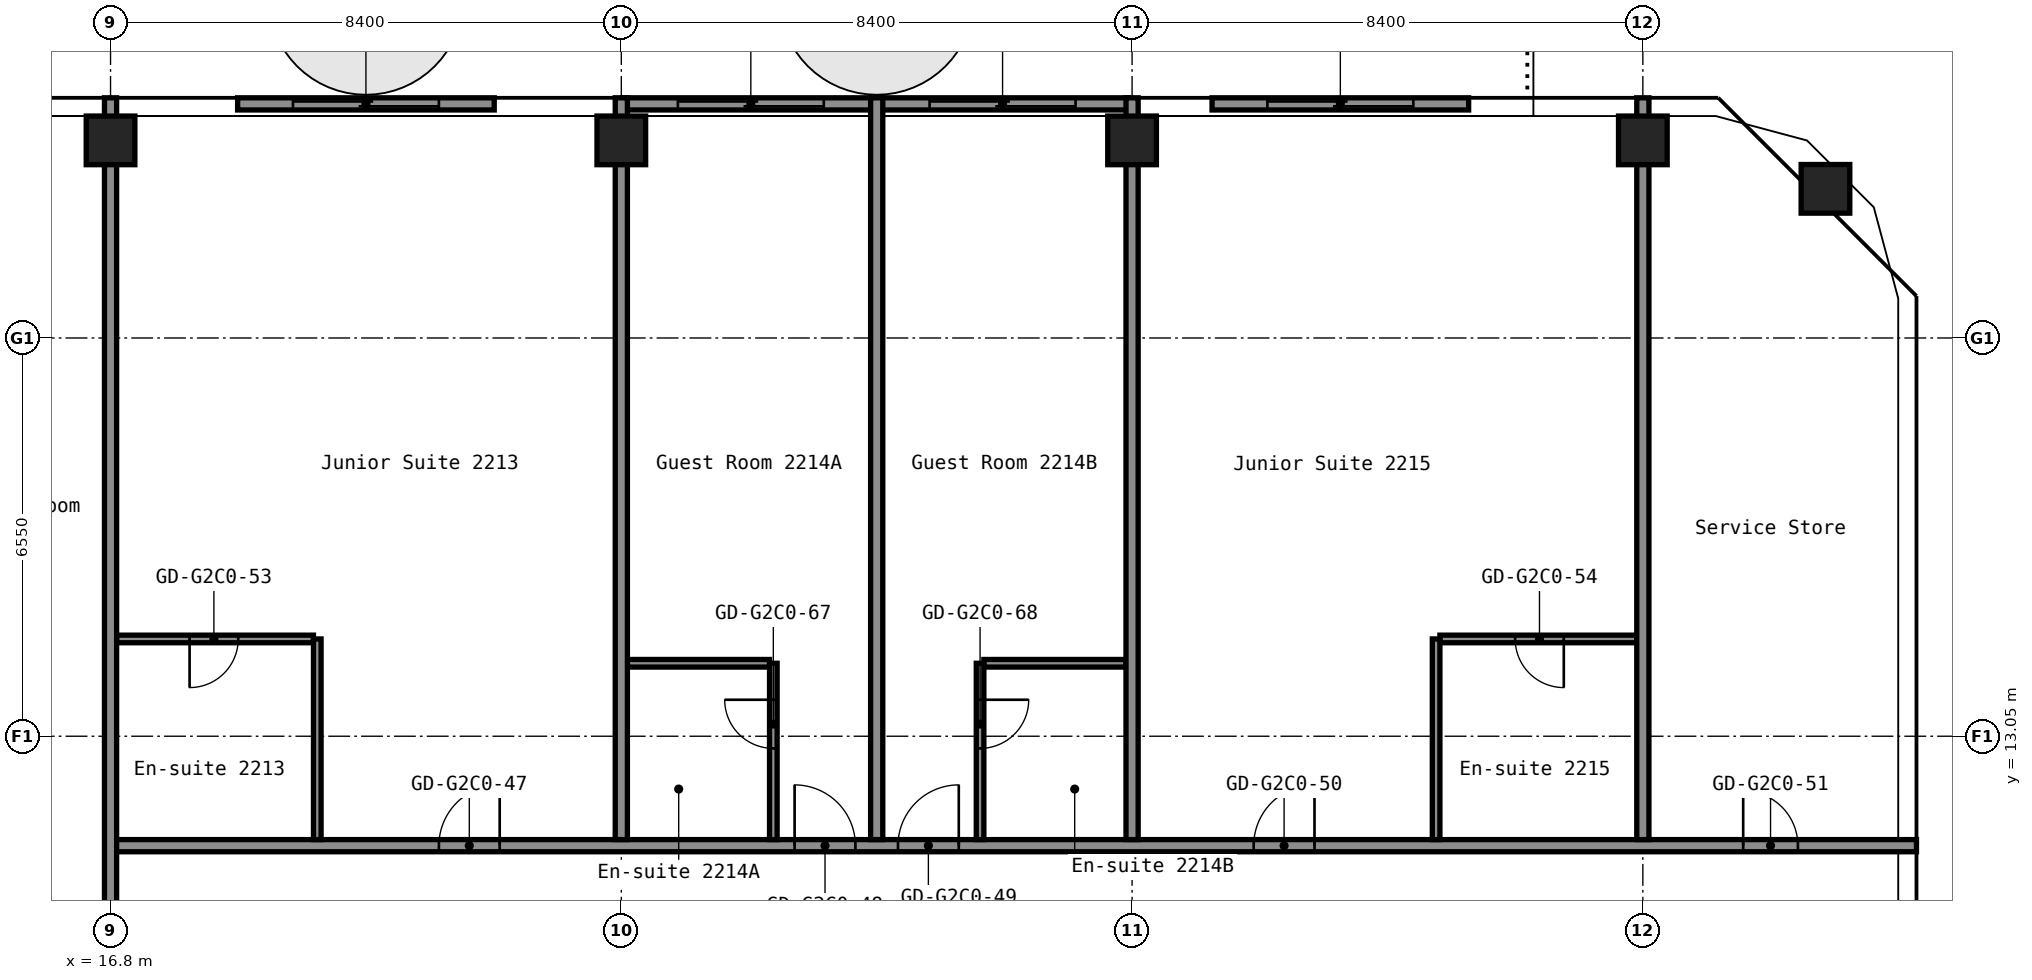
"""IFC4 building model, lengths in metres.
Left out: names, types, materials, properties, quantities, classifications, styles, units other than length and angle.
Written with IfcOpenShell. Run it as: python <this file> out.ifc"""

import sys

from ifc_helpers import new_model, si_unit, direction, frame, frame_2d, origin, origin_2d, place, context, subcontext, project, spatial, rectangle, hollow_rectangle, extrude, element, fill, save


model = new_model("IFC4")
c1 = context("Model", 3, precision=1e-05, world=origin(), true_north=direction((0.0, 1.0)))
c2 = subcontext(c1, "Body", "Model", "MODEL_VIEW")
j1 = project(units=[si_unit("LENGTHUNIT", "METRE"), si_unit("PLANEANGLEUNIT", "RADIAN")], contexts=[c1])
p1 = place(None, origin())
s1 = spatial("IfcSite", under=j1, at=p1, CompositionType="ELEMENT")
p2 = place(p1, origin())
s2 = spatial("IfcBuilding", under=s1, at=p2, CompositionType="ELEMENT")
p3 = place(p2, frame((0.0, 0.0, 81.8)))
s3 = spatial("IfcBuildingStorey", under=s2, at=p3, CompositionType="ELEMENT", Elevation=81.8)
for number, where, z_axis, x_axis in (
    (1, (16.8, 22.85, 0.0), (0.0, 0.0, 1.0), (1.0, 0.0, 0.0)),
    (2, (25.2, 22.85, 0.0), (0.0, 0.0, 1.0), (1.0, 0.0, 0.0)),
    (3, (33.6, 22.85, 0.0), (0.0, 0.0, 1.0), (1.0, 0.0, 0.0)),
    (4, (42.0, 22.85, 0.0), (0.0, 0.0, 1.0), (1.0, 0.0, 0.0)),
    (5, (45.003, 22.053, 0.0), (0.0, 0.0, 1.0), (1.0, 0.0, 0.0)),
):
    element("IfcColumn", number, at=place(p3, frame(where, z_axis=z_axis, x_axis=x_axis)), inside=s3, PredefinedType="COLUMN", context=c2, shape_type="SweptSolid", body=[
        extrude(hollow_rectangle(XDim=0.8, YDim=0.8, WallThickness=0.032, at=origin_2d()), origin(), (0.0, 0.0, 1.0), 2.8),
    ])
p4 = place(p3, frame((16.8, 11.25, 0.0), z_axis=(0.0, 0.0, 1.0), x_axis=(1.0, 0.0, 0.0)))
e6 = element("IfcWall", 6, at=p4, inside=s3, PredefinedType="PARTITIONING", context=c2, shape_type="SweptSolid", body=[
    extrude(rectangle(XDim=29.7, YDim=0.2, at=frame_2d((14.85, 0.0))), origin(), (0.0, 0.0, 1.0), 2.8),
])
p5 = place(p4, frame((5.4, 0.0, 0.0)))
e7 = element("IfcOpeningElement", 7, at=p5, cuts=e6, PredefinedType="OPENING", context=c2, shape_type="SweptSolid", body=[
    extrude(rectangle(XDim=1.0, YDim=2.1, at=frame_2d((0.5, 1.05))), frame((0.0, 0.11, 0.0), z_axis=(0.0, -1.0, 0.0), x_axis=(1.0, 0.0, 0.0)), (0.0, 0.0, 1.0), 0.22),
])
p6 = place(p4, frame((11.25, 0.0, 0.0)))
e8 = element("IfcOpeningElement", 8, at=p6, cuts=e6, PredefinedType="OPENING", context=c2, shape_type="SweptSolid", body=[
    extrude(rectangle(XDim=1.0, YDim=2.1, at=frame_2d((0.5, 1.05))), frame((0.0, 0.11, 0.0), z_axis=(0.0, -1.0, 0.0), x_axis=(1.0, 0.0, 0.0)), (0.0, 0.0, 1.0), 0.22),
])
p7 = place(p4, frame((12.95, 0.0, 0.0)))
e9 = element("IfcOpeningElement", 9, at=p7, cuts=e6, PredefinedType="OPENING", context=c2, shape_type="SweptSolid", body=[
    extrude(rectangle(XDim=1.0, YDim=2.1, at=frame_2d((0.5, 1.05))), frame((0.0, 0.11, 0.0), z_axis=(0.0, -1.0, 0.0), x_axis=(1.0, 0.0, 0.0)), (0.0, 0.0, 1.0), 0.22),
])
p8 = place(p4, frame((18.8, 0.0, 0.0)))
e10 = element("IfcOpeningElement", 10, at=p8, cuts=e6, PredefinedType="OPENING", context=c2, shape_type="SweptSolid", body=[
    extrude(rectangle(XDim=1.0, YDim=2.1, at=frame_2d((0.5, 1.05))), frame((0.0, 0.11, 0.0), z_axis=(0.0, -1.0, 0.0), x_axis=(1.0, 0.0, 0.0)), (0.0, 0.0, 1.0), 0.22),
])
p9 = place(p4, frame((26.85, 0.0, 0.0)))
e11 = element("IfcOpeningElement", 11, at=p9, cuts=e6, PredefinedType="OPENING", context=c2, shape_type="SweptSolid", body=[
    extrude(rectangle(XDim=0.9, YDim=2.1, at=frame_2d((0.45, 1.05))), frame((0.0, 0.11, 0.0), z_axis=(0.0, -1.0, 0.0), x_axis=(1.0, 0.0, 0.0)), (0.0, 0.0, 1.0), 0.22),
])
for number, where, z_axis, x_axis in (
    (12, (25.3, 14.25, 0.0), (0.0, 0.0, 1.0), (1.0, 0.0, 0.0)),
    (13, (31.163, 14.25, 0.0), (0.0, 0.0, 1.0), (1.0, 0.0, 0.0)),
):
    element("IfcWall", number, at=place(p3, frame(where, z_axis=z_axis, x_axis=x_axis)), inside=s3, PredefinedType="PARTITIONING", context=c2, shape_type="SweptSolid", body=[
        extrude(rectangle(XDim=2.337, YDim=0.125, at=frame_2d((1.169, 0.0))), origin(), (0.0, 0.0, 1.0), 2.8),
    ])
p10 = place(p3, frame((16.9, 14.65, 0.0), z_axis=(0.0, 0.0, 1.0), x_axis=(1.0, 0.0, 0.0)))
e14 = element("IfcWall", 14, at=p10, inside=s3, PredefinedType="PARTITIONING", context=c2, shape_type="SweptSolid", body=[
    extrude(rectangle(XDim=3.238, YDim=0.125, at=frame_2d((1.619, 0.0))), origin(), (0.0, 0.0, 1.0), 2.8),
])
p11 = place(p10, frame((1.2, 0.0, 0.0)))
e15 = element("IfcOpeningElement", 15, at=p11, cuts=e14, PredefinedType="OPENING", context=c2, shape_type="SweptSolid", body=[
    extrude(rectangle(XDim=0.8, YDim=2.1, at=frame_2d((0.4, 1.05))), frame((0.0, 0.073, 0.0), z_axis=(0.0, -1.0, 0.0), x_axis=(1.0, 0.0, 0.0)), (0.0, 0.0, 1.0), 0.145),
])
p12 = place(p3, frame((38.663, 14.65, 0.0), z_axis=(0.0, 0.0, 1.0), x_axis=(1.0, 0.0, 0.0)))
e16 = element("IfcWall", 16, at=p12, inside=s3, PredefinedType="PARTITIONING", context=c2, shape_type="SweptSolid", body=[
    extrude(rectangle(XDim=3.237, YDim=0.125, at=frame_2d((1.619, 0.0))), origin(), (0.0, 0.0, 1.0), 2.8),
])
p13 = place(p12, frame((1.238, 0.0, 0.0)))
e17 = element("IfcOpeningElement", 17, at=p13, cuts=e16, PredefinedType="OPENING", context=c2, shape_type="SweptSolid", body=[
    extrude(rectangle(XDim=0.8, YDim=2.1, at=frame_2d((0.4, 1.05))), frame((0.0, 0.073, 0.0), z_axis=(0.0, -1.0, 0.0), x_axis=(1.0, 0.0, 0.0)), (0.0, 0.0, 1.0), 0.145),
])
p14 = place(p3, frame((16.8, 10.19, 0.0), z_axis=(0.0, 0.0, 1.0), x_axis=(0.0, 1.0, 0.0)))
e18 = element("IfcWall", 18, at=p14, inside=s3, PredefinedType="PARTITIONING", context=c2, shape_type="SweptSolid", body=[
    extrude(rectangle(XDim=13.36, YDim=0.2, at=frame_2d((6.68, 0.0))), origin(), (0.0, 0.0, 1.0), 2.8),
])
p15 = place(p3, frame((20.2, 11.35, 0.0), z_axis=(0.0, 0.0, 1.0), x_axis=(0.0, 1.0, 0.0)))
e19 = element("IfcWall", 19, at=p15, inside=s3, PredefinedType="PARTITIONING", context=c2, shape_type="SweptSolid", body=[
    extrude(rectangle(XDim=3.3, YDim=0.125, at=frame_2d((1.65, 0.0))), origin(), (0.0, 0.0, 1.0), 2.8),
])
p16 = place(p3, frame((25.2, 11.35, 0.0), z_axis=(0.0, 0.0, 1.0), x_axis=(0.0, 1.0, 0.0)))
e20 = element("IfcWall", 20, at=p16, inside=s3, PredefinedType="PARTITIONING", context=c2, shape_type="SweptSolid", body=[
    extrude(rectangle(XDim=12.2, YDim=0.2, at=frame_2d((6.1, 0.0))), origin(), (0.0, 0.0, 1.0), 2.8),
])
p17 = place(p3, frame((27.7, 11.35, 0.0), z_axis=(0.0, 0.0, 1.0), x_axis=(0.0, 1.0, 0.0)))
e21 = element("IfcWall", 21, at=p17, inside=s3, PredefinedType="PARTITIONING", context=c2, shape_type="SweptSolid", body=[
    extrude(rectangle(XDim=2.9, YDim=0.125, at=frame_2d((1.45, 0.0))), origin(), (0.0, 0.0, 1.0), 2.8),
])
p18 = place(p17, frame((1.5, 0.0, 0.0)))
e22 = element("IfcOpeningElement", 22, at=p18, cuts=e21, PredefinedType="OPENING", context=c2, shape_type="SweptSolid", body=[
    extrude(rectangle(XDim=0.8, YDim=2.1, at=frame_2d((0.4, 1.05))), frame((0.0, 0.073, 0.0), z_axis=(0.0, -1.0, 0.0), x_axis=(1.0, 0.0, 0.0)), (0.0, 0.0, 1.0), 0.145),
])
p19 = place(p3, frame((29.4, 11.35, 0.0), z_axis=(0.0, 0.0, 1.0), x_axis=(0.0, 1.0, 0.0)))
e23 = element("IfcWall", 23, at=p19, inside=s3, PredefinedType="PARTITIONING", context=c2, shape_type="SweptSolid", body=[
    extrude(rectangle(XDim=12.2, YDim=0.2, at=frame_2d((6.1, 0.0))), origin(), (0.0, 0.0, 1.0), 2.8),
])
p20 = place(p3, frame((31.1, 11.35, 0.0), z_axis=(0.0, 0.0, 1.0), x_axis=(0.0, 1.0, 0.0)))
e24 = element("IfcWall", 24, at=p20, inside=s3, PredefinedType="PARTITIONING", context=c2, shape_type="SweptSolid", body=[
    extrude(rectangle(XDim=2.9, YDim=0.125, at=frame_2d((1.45, 0.0))), origin(), (0.0, 0.0, 1.0), 2.8),
])
p21 = place(p20, frame((1.5, 0.0, 0.0)))
e25 = element("IfcOpeningElement", 25, at=p21, cuts=e24, PredefinedType="OPENING", context=c2, shape_type="SweptSolid", body=[
    extrude(rectangle(XDim=0.8, YDim=2.1, at=frame_2d((0.4, 1.05))), frame((0.0, 0.073, 0.0), z_axis=(0.0, -1.0, 0.0), x_axis=(1.0, 0.0, 0.0)), (0.0, 0.0, 1.0), 0.145),
])
p22 = place(p3, frame((33.6, 11.35, 0.0), z_axis=(0.0, 0.0, 1.0), x_axis=(0.0, 1.0, 0.0)))
e26 = element("IfcWall", 26, at=p22, inside=s3, PredefinedType="PARTITIONING", context=c2, shape_type="SweptSolid", body=[
    extrude(rectangle(XDim=12.2, YDim=0.2, at=frame_2d((6.1, 0.0))), origin(), (0.0, 0.0, 1.0), 2.8),
])
p23 = place(p3, frame((38.6, 11.35, 0.0), z_axis=(0.0, 0.0, 1.0), x_axis=(0.0, 1.0, 0.0)))
e27 = element("IfcWall", 27, at=p23, inside=s3, PredefinedType="PARTITIONING", context=c2, shape_type="SweptSolid", body=[
    extrude(rectangle(XDim=3.3, YDim=0.125, at=frame_2d((1.65, 0.0))), origin(), (0.0, 0.0, 1.0), 2.8),
])
p24 = place(p3, frame((42.0, 11.35, 0.0), z_axis=(0.0, 0.0, 1.0), x_axis=(0.0, 1.0, 0.0)))
e28 = element("IfcWall", 28, at=p24, inside=s3, PredefinedType="PARTITIONING", context=c2, shape_type="SweptSolid", body=[
    extrude(rectangle(XDim=12.2, YDim=0.2, at=frame_2d((6.1, 0.0))), origin(), (0.0, 0.0, 1.0), 2.8),
])
p25 = place(p3, frame((39.135, 23.45, 0.0), z_axis=(0.0, 0.0, 1.0), x_axis=(-1.0, 0.0, 0.0)))
p26 = place(p25, frame((0.91, 0.0, 0.0)))
p27 = place(p26, frame((2.4, 0.0, 0.0), z_axis=(0.0, 0.0, 1.0), x_axis=(-1.0, 0.0, 0.0)))
e29 = element("IfcDoor", 29, at=p27, inside=s3, OperationType="SLIDING_TO_LEFT", PredefinedType="DOOR", context=c2, shape_type="SweptSolid", body=[
    extrude(rectangle(XDim=2.4, YDim=2.2, at=frame_2d((1.2, 1.1))), frame((0.0, 0.025, 0.0), z_axis=(0.0, -1.0, 0.0), x_axis=(1.0, 0.0, 0.0)), (0.0, 0.0, 1.0), 0.05),
])
p28 = place(p3, frame((33.58, 23.45, 0.0), z_axis=(0.0, 0.0, 1.0), x_axis=(-1.0, 0.0, 0.0)))
p29 = place(p28, frame((0.91, 0.0, 0.0)))
p30 = place(p29, frame((2.4, 0.0, 0.0), z_axis=(0.0, 0.0, 1.0), x_axis=(-1.0, 0.0, 0.0)))
e30 = element("IfcDoor", 30, at=p30, inside=s3, OperationType="SLIDING_TO_LEFT", PredefinedType="DOOR", context=c2, shape_type="SweptSolid", body=[
    extrude(rectangle(XDim=2.4, YDim=2.2, at=frame_2d((1.2, 1.1))), frame((0.0, 0.025, 0.0), z_axis=(0.0, -1.0, 0.0), x_axis=(1.0, 0.0, 0.0)), (0.0, 0.0, 1.0), 0.05),
])
p31 = place(p3, frame((29.44, 23.45, 0.0), z_axis=(0.0, 0.0, 1.0), x_axis=(-1.0, 0.0, 0.0)))
p32 = place(p31, frame((0.91, 0.0, 0.0)))
p33 = place(p32, frame((2.4, 0.0, 0.0), z_axis=(0.0, 0.0, 1.0), x_axis=(-1.0, 0.0, 0.0)))
e31 = element("IfcDoor", 31, at=p33, inside=s3, OperationType="SLIDING_TO_LEFT", PredefinedType="DOOR", context=c2, shape_type="SweptSolid", body=[
    extrude(rectangle(XDim=2.4, YDim=2.2, at=frame_2d((1.2, 1.1))), frame((0.0, 0.025, 0.0), z_axis=(0.0, -1.0, 0.0), x_axis=(1.0, 0.0, 0.0)), (0.0, 0.0, 1.0), 0.05),
])
p34 = place(p3, frame((23.11, 23.45, 0.0), z_axis=(0.0, 0.0, 1.0), x_axis=(-1.0, 0.0, 0.0)))
p35 = place(p34, frame((0.91, 0.0, 0.0)))
p36 = place(p35, frame((2.4, 0.0, 0.0), z_axis=(0.0, 0.0, 1.0), x_axis=(-1.0, 0.0, 0.0)))
e32 = element("IfcDoor", 32, at=p36, inside=s3, OperationType="SLIDING_TO_LEFT", PredefinedType="DOOR", context=c2, shape_type="SweptSolid", body=[
    extrude(rectangle(XDim=2.4, YDim=2.2, at=frame_2d((1.2, 1.1))), frame((0.0, 0.025, 0.0), z_axis=(0.0, -1.0, 0.0), x_axis=(1.0, 0.0, 0.0)), (0.0, 0.0, 1.0), 0.05),
])
p37 = place(p5, origin())
e33 = element("IfcDoor", 33, at=p37, inside=s3, OperationType="SINGLE_SWING_LEFT", PredefinedType="DOOR", context=c2, shape_type="SweptSolid", body=[
    extrude(rectangle(XDim=1.0, YDim=2.1, at=frame_2d((0.5, 1.05))), frame((0.0, 0.025, 0.0), z_axis=(0.0, -1.0, 0.0), x_axis=(1.0, 0.0, 0.0)), (0.0, 0.0, 1.0), 0.05),
])
fill(e7, e33)
p38 = place(p6, origin())
e34 = element("IfcDoor", 34, at=p38, inside=s3, OperationType="SINGLE_SWING_RIGHT", PredefinedType="DOOR", context=c2, shape_type="SweptSolid", body=[
    extrude(rectangle(XDim=1.0, YDim=2.1, at=frame_2d((0.5, 1.05))), frame((0.0, 0.025, 0.0), z_axis=(0.0, -1.0, 0.0), x_axis=(1.0, 0.0, 0.0)), (0.0, 0.0, 1.0), 0.05),
])
fill(e8, e34)
p39 = place(p7, origin())
e35 = element("IfcDoor", 35, at=p39, inside=s3, OperationType="SINGLE_SWING_LEFT", PredefinedType="DOOR", context=c2, shape_type="SweptSolid", body=[
    extrude(rectangle(XDim=1.0, YDim=2.1, at=frame_2d((0.5, 1.05))), frame((0.0, 0.025, 0.0), z_axis=(0.0, -1.0, 0.0), x_axis=(1.0, 0.0, 0.0)), (0.0, 0.0, 1.0), 0.05),
])
fill(e9, e35)
p40 = place(p8, origin())
e36 = element("IfcDoor", 36, at=p40, inside=s3, OperationType="SINGLE_SWING_LEFT", PredefinedType="DOOR", context=c2, shape_type="SweptSolid", body=[
    extrude(rectangle(XDim=1.0, YDim=2.1, at=frame_2d((0.5, 1.05))), frame((0.0, 0.025, 0.0), z_axis=(0.0, -1.0, 0.0), x_axis=(1.0, 0.0, 0.0)), (0.0, 0.0, 1.0), 0.05),
])
fill(e10, e36)
p41 = place(p9, origin())
e37 = element("IfcDoor", 37, at=p41, inside=s3, OperationType="SINGLE_SWING_RIGHT", PredefinedType="DOOR", context=c2, shape_type="SweptSolid", body=[
    extrude(rectangle(XDim=0.9, YDim=2.1, at=frame_2d((0.45, 1.05))), frame((0.0, 0.025, 0.0), z_axis=(0.0, -1.0, 0.0), x_axis=(1.0, 0.0, 0.0)), (0.0, 0.0, 1.0), 0.05),
])
fill(e11, e37)
p42 = place(p11, origin())
e38 = element("IfcDoor", 38, at=p42, inside=s3, OperationType="SINGLE_SWING_LEFT", PredefinedType="DOOR", context=c2, shape_type="SweptSolid", body=[
    extrude(rectangle(XDim=0.8, YDim=2.1, at=frame_2d((0.4, 1.05))), frame((0.0, 0.025, 0.0), z_axis=(0.0, -1.0, 0.0), x_axis=(1.0, 0.0, 0.0)), (0.0, 0.0, 1.0), 0.05),
])
fill(e15, e38)
p43 = place(p13, origin())
e39 = element("IfcDoor", 39, at=p43, inside=s3, OperationType="SINGLE_SWING_RIGHT", PredefinedType="DOOR", context=c2, shape_type="SweptSolid", body=[
    extrude(rectangle(XDim=0.8, YDim=2.1, at=frame_2d((0.4, 1.05))), frame((0.0, 0.025, 0.0), z_axis=(0.0, -1.0, 0.0), x_axis=(1.0, 0.0, 0.0)), (0.0, 0.0, 1.0), 0.05),
])
fill(e17, e39)
p44 = place(p18, origin())
e40 = element("IfcDoor", 40, at=p44, inside=s3, OperationType="SINGLE_SWING_LEFT", PredefinedType="DOOR", context=c2, shape_type="SweptSolid", body=[
    extrude(rectangle(XDim=0.8, YDim=2.1, at=frame_2d((0.4, 1.05))), frame((0.0, 0.025, 0.0), z_axis=(0.0, -1.0, 0.0), x_axis=(1.0, 0.0, 0.0)), (0.0, 0.0, 1.0), 0.05),
])
fill(e22, e40)
p45 = place(p21, origin())
e41 = element("IfcDoor", 41, at=p45, inside=s3, OperationType="SINGLE_SWING_RIGHT", PredefinedType="DOOR", context=c2, shape_type="SweptSolid", body=[
    extrude(rectangle(XDim=0.8, YDim=2.1, at=frame_2d((0.4, 1.05))), frame((0.0, 0.025, 0.0), z_axis=(0.0, -1.0, 0.0), x_axis=(1.0, 0.0, 0.0)), (0.0, 0.0, 1.0), 0.05),
])
fill(e25, e41)
save(model, sys.argv[1])
